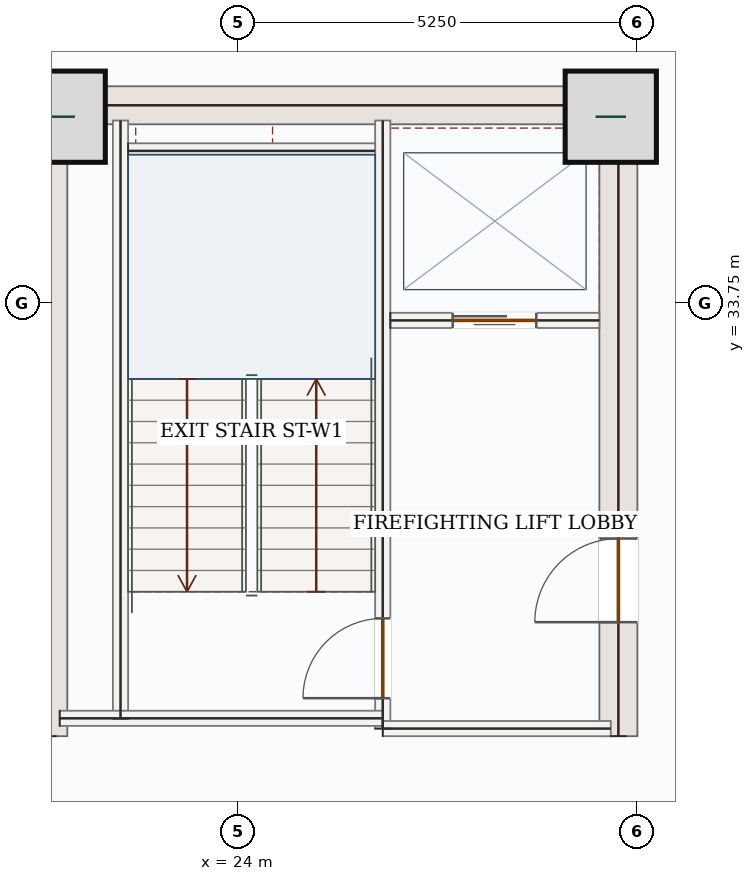
"""IFC4 building model, lengths in metres.
Left out: names, types, materials, properties, quantities, classifications, styles, units other than length and angle.
Written with IfcOpenShell. Run it as: python <this file> out.ifc"""

import sys

from ifc_helpers import new_model, si_unit, direction, frame, frame_2d, origin, origin_2d, place, context, subcontext, project, spatial, rectangle, extrude, source, transform, mapped, element, fill, save


model = new_model("IFC4")
c1 = context("Model", 3, precision=1e-05, world=origin(), true_north=direction((0.0, 1.0)))
c2 = subcontext(c1, "Body", "Model", "MODEL_VIEW")
j1 = project(units=[si_unit("LENGTHUNIT", "METRE"), si_unit("PLANEANGLEUNIT", "RADIAN")], contexts=[c1])
p1 = place(None, origin())
s1 = spatial("IfcSite", under=j1, at=p1, CompositionType="ELEMENT")
p2 = place(p1, origin())
s2 = spatial("IfcBuilding", under=s1, at=p2, CompositionType="ELEMENT")
p3 = place(p2, frame((0.0, 0.0, 178.5)))
s3 = spatial("IfcBuildingStorey", under=s2, at=p3, CompositionType="ELEMENT", Elevation=178.5)
m1 = source(origin(), c2, "Body", "SweptSolid", [
    extrude(rectangle(XDim=8.55, YDim=0.5, at=frame_2d((4.275, 0.0))), origin(), (0.0, 0.0, 1.0), 3.62),
])
p4 = place(p3, frame((21.5, 28.05, 0.0), z_axis=(0.0, 0.0, 1.0), x_axis=(0.0, 1.0, 0.0)))
e1 = element("IfcWall", 1, at=p4, inside=s3, PredefinedType="SHEAR", context=c2, shape_type="MappedRepresentation", body=[
    mapped(m1, transform((0.0, 0.0, 0.0), x_axis=(1.0, 0.0, 0.0), y_axis=(0.0, 1.0, 0.0), z_axis=(0.0, 0.0, 1.0), scale=1.0)),
])
p5 = place(p3, frame((29.0, 28.05, 0.0), z_axis=(0.0, 0.0, 1.0), x_axis=(0.0, 1.0, 0.0)))
e2 = element("IfcWall", 2, at=p5, inside=s3, PredefinedType="SHEAR", context=c2, shape_type="SweptSolid", body=[
    extrude(rectangle(XDim=8.55, YDim=0.5, at=frame_2d((4.275, 0.0))), origin(), (0.0, 0.0, 1.0), 3.62),
])
p6 = place(p5, frame((1.5, 0.0, 0.0)))
e3 = element("IfcOpeningElement", 3, at=p6, cuts=e2, PredefinedType="OPENING", context=c2, shape_type="SweptSolid", body=[
    extrude(rectangle(XDim=1.1, YDim=2.2, at=frame_2d((0.55, 1.1))), frame((0.0, 0.26, 0.0), z_axis=(0.0, -1.0, 0.0), x_axis=(1.0, 0.0, 0.0)), (0.0, 0.0, 1.0), 0.52),
])
m2 = source(origin(), c2, "Body", "SweptSolid", [
    extrude(rectangle(XDim=7.0, YDim=0.5, at=frame_2d((3.5, 0.0))), origin(), (0.0, 0.0, 1.0), 3.62),
])
p7 = place(p3, frame((21.75, 36.35, 0.0), z_axis=(0.0, 0.0, 1.0), x_axis=(1.0, 0.0, 0.0)))
e4 = element("IfcWall", 4, at=p7, inside=s3, PredefinedType="SHEAR", context=c2, shape_type="MappedRepresentation", body=[
    mapped(m2, transform((0.0, 0.0, 0.0), x_axis=(1.0, 0.0, 0.0), y_axis=(0.0, 1.0, 0.0), z_axis=(0.0, 0.0, 1.0), scale=1.0)),
])
m3 = source(origin(), c2, "Body", "SweptSolid", [
    extrude(rectangle(XDim=1.2, YDim=1.2, at=origin_2d()), origin(), (0.0, 0.0, 1.0), 3.9),
])
for number, where, z_axis, x_axis in (
    (5, (21.65, 36.2, 0.0), (0.0, 0.0, 1.0), (1.0, 0.0, 0.0)),
    (6, (28.9, 36.2, 0.0), (0.0, 0.0, 1.0), (1.0, 0.0, 0.0)),
):
    element("IfcColumn", number, at=place(p3, frame(where, z_axis=z_axis, x_axis=x_axis)), inside=s3, PredefinedType="COLUMN", context=c2, shape_type="MappedRepresentation", body=[
        mapped(m3, transform((0.0, 0.0, 0.0), x_axis=(1.0, 0.0, 0.0), y_axis=(0.0, 1.0, 0.0), z_axis=(0.0, 0.0, 1.0), scale=1.0)),
    ])
m4 = source(origin(), c2, "Body", "SweptSolid", [
    extrude(rectangle(XDim=5.258, YDim=0.28, at=frame_2d((2.629, 0.0))), origin(), (0.0, 0.0, 1.0), 3.62),
])
p8 = place(p3, frame((18.94, 35.542, 0.0), z_axis=(0.0, 0.0, 1.0), x_axis=(0.707106781187, 0.707106781187, 0.0)))
e7 = element("IfcWall", 7, at=p8, inside=s3, PredefinedType="SOLIDWALL", context=c2, shape_type="MappedRepresentation", body=[
    mapped(m4, transform((0.0, 0.0, 0.0), x_axis=(1.0, 0.0, 0.0), y_axis=(0.0, 1.0, 0.0), z_axis=(0.0, 0.0, 1.0), scale=1.0)),
])
m5 = source(origin(), c2, "Body", "SweptSolid", [
    extrude(rectangle(XDim=7.87, YDim=0.2, at=frame_2d((3.935, 0.0))), origin(), (0.0, 0.0, 1.0), 3.62),
])
p9 = place(p3, frame((22.45, 28.28, 0.0), z_axis=(0.0, 0.0, 1.0), x_axis=(0.0, 1.0, 0.0)))
e8 = element("IfcWall", 8, at=p9, inside=s3, PredefinedType="SOLIDWALL", context=c2, shape_type="MappedRepresentation", body=[
    mapped(m5, transform((0.0, 0.0, 0.0), x_axis=(1.0, 0.0, 0.0), y_axis=(0.0, 1.0, 0.0), z_axis=(0.0, 0.0, 1.0), scale=1.0)),
])
p10 = place(p3, frame((25.9, 28.15, 0.0), z_axis=(0.0, 0.0, 1.0), x_axis=(0.0, 1.0, 0.0)))
e9 = element("IfcWall", 9, at=p10, inside=s3, PredefinedType="SOLIDWALL", context=c2, shape_type="SweptSolid", body=[
    extrude(rectangle(XDim=8.0, YDim=0.2, at=frame_2d((4.0, 0.0))), origin(), (0.0, 0.0, 1.0), 3.62),
])
p11 = place(p10, frame((0.4, 0.0, 0.0)))
e10 = element("IfcOpeningElement", 10, at=p11, cuts=e9, PredefinedType="OPENING", context=c2, shape_type="SweptSolid", body=[
    extrude(rectangle(XDim=1.05, YDim=2.15, at=frame_2d((0.525, 1.075))), frame((0.0, 0.11, 0.0), z_axis=(0.0, -1.0, 0.0), x_axis=(1.0, 0.0, 0.0)), (0.0, 0.0, 1.0), 0.22),
])
m6 = source(origin(), c2, "Body", "SweptSolid", [
    extrude(rectangle(XDim=4.25, YDim=0.2, at=frame_2d((2.125, 0.0))), origin(), (0.0, 0.0, 1.0), 3.62),
])
p12 = place(p3, frame((21.65, 28.285, 0.0), z_axis=(0.0, 0.0, 1.0), x_axis=(1.0, 0.0, 0.0)))
e11 = element("IfcWall", 11, at=p12, inside=s3, PredefinedType="SOLIDWALL", context=c2, shape_type="MappedRepresentation", body=[
    mapped(m6, transform((0.0, 0.0, 0.0), x_axis=(1.0, 0.0, 0.0), y_axis=(0.0, 1.0, 0.0), z_axis=(0.0, 0.0, 1.0), scale=1.0)),
])
m7 = source(origin(), c2, "Body", "SweptSolid", [
    extrude(rectangle(XDim=3.0, YDim=0.2, at=frame_2d((1.5, 0.0))), origin(), (0.0, 0.0, 1.0), 3.62),
])
p13 = place(p3, frame((25.9, 28.15, 0.0), z_axis=(0.0, 0.0, 1.0), x_axis=(1.0, 0.0, 0.0)))
e12 = element("IfcWall", 12, at=p13, inside=s3, PredefinedType="SOLIDWALL", context=c2, shape_type="MappedRepresentation", body=[
    mapped(m7, transform((0.0, 0.0, 0.0), x_axis=(1.0, 0.0, 0.0), y_axis=(0.0, 1.0, 0.0), z_axis=(0.0, 0.0, 1.0), scale=1.0)),
])
m8 = source(origin(), c2, "Body", "SweptSolid", [
    extrude(rectangle(XDim=3.25, YDim=0.2, at=frame_2d((1.625, 0.0))), origin(), (0.0, 0.0, 1.0), 3.62),
])
p14 = place(p3, frame((22.55, 35.75, 0.0), z_axis=(0.0, 0.0, 1.0), x_axis=(1.0, 0.0, 0.0)))
e13 = element("IfcWall", 13, at=p14, inside=s3, PredefinedType="SOLIDWALL", context=c2, shape_type="MappedRepresentation", body=[
    mapped(m8, transform((0.0, 0.0, 0.0), x_axis=(1.0, 0.0, 0.0), y_axis=(0.0, 1.0, 0.0), z_axis=(0.0, 0.0, 1.0), scale=1.0)),
])
p15 = place(p3, frame((26.0, 33.52, 0.0), z_axis=(0.0, 0.0, 1.0), x_axis=(1.0, 0.0, 0.0)))
e14 = element("IfcWall", 14, at=p15, inside=s3, PredefinedType="SOLIDWALL", context=c2, shape_type="SweptSolid", body=[
    extrude(rectangle(XDim=2.75, YDim=0.2, at=frame_2d((1.375, 0.0))), origin(), (0.0, 0.0, 1.0), 3.62),
])
p16 = place(p15, frame((0.82, 0.0, 0.0)))
e15 = element("IfcOpeningElement", 15, at=p16, cuts=e14, PredefinedType="OPENING", context=c2, shape_type="SweptSolid", body=[
    extrude(rectangle(XDim=1.1, YDim=2.15, at=frame_2d((0.55, 1.075))), frame((0.0, 0.11, 0.0), z_axis=(0.0, -1.0, 0.0), x_axis=(1.0, 0.0, 0.0)), (0.0, 0.0, 1.0), 0.22),
])
m9 = source(origin(), c2, "Body", "SweptSolid", [
    extrude(rectangle(XDim=1.05, YDim=2.15, at=frame_2d((0.525, 1.075))), frame((0.0, 0.025, 0.0), z_axis=(0.0, -1.0, 0.0), x_axis=(1.0, 0.0, 0.0)), (0.0, 0.0, 1.0), 0.05),
])
p17 = place(p11, origin())
e16 = element("IfcDoor", 16, at=p17, inside=s3, OperationType="SINGLE_SWING_LEFT", PredefinedType="DOOR", context=c2, shape_type="MappedRepresentation", body=[
    mapped(m9, transform((0.0, 0.0, 0.0), x_axis=(1.0, 0.0, 0.0), y_axis=(0.0, 1.0, 0.0), z_axis=(0.0, 0.0, 1.0), scale=1.0)),
])
fill(e10, e16)
m10 = source(origin(), c2, "Body", "SweptSolid", [
    extrude(rectangle(XDim=1.1, YDim=2.15, at=frame_2d((0.55, 1.075))), frame((0.0, 0.025, 0.0), z_axis=(0.0, -1.0, 0.0), x_axis=(1.0, 0.0, 0.0)), (0.0, 0.0, 1.0), 0.05),
])
p18 = place(p16, origin())
e17 = element("IfcDoor", 17, at=p18, inside=s3, OperationType="DOUBLE_DOOR_SLIDING", PredefinedType="DOOR", context=c2, shape_type="MappedRepresentation", body=[
    mapped(m10, transform((0.0, 0.0, 0.0), x_axis=(1.0, 0.0, 0.0), y_axis=(0.0, 1.0, 0.0), z_axis=(0.0, 0.0, 1.0), scale=1.0)),
])
fill(e15, e17)
m11 = source(origin(), c2, "Body", "SweptSolid", [
    extrude(rectangle(XDim=1.1, YDim=2.2, at=frame_2d((0.55, 1.1))), frame((0.0, 0.025, 0.0), z_axis=(0.0, -1.0, 0.0), x_axis=(1.0, 0.0, 0.0)), (0.0, 0.0, 1.0), 0.05),
])
p19 = place(p6, origin())
e18 = element("IfcDoor", 18, at=p19, inside=s3, OperationType="SINGLE_SWING_LEFT", PredefinedType="DOOR", context=c2, shape_type="MappedRepresentation", body=[
    mapped(m11, transform((0.0, 0.0, 0.0), x_axis=(1.0, 0.0, 0.0), y_axis=(0.0, 1.0, 0.0), z_axis=(0.0, 0.0, 1.0), scale=1.0)),
])
fill(e3, e18)
save(model, sys.argv[1])
